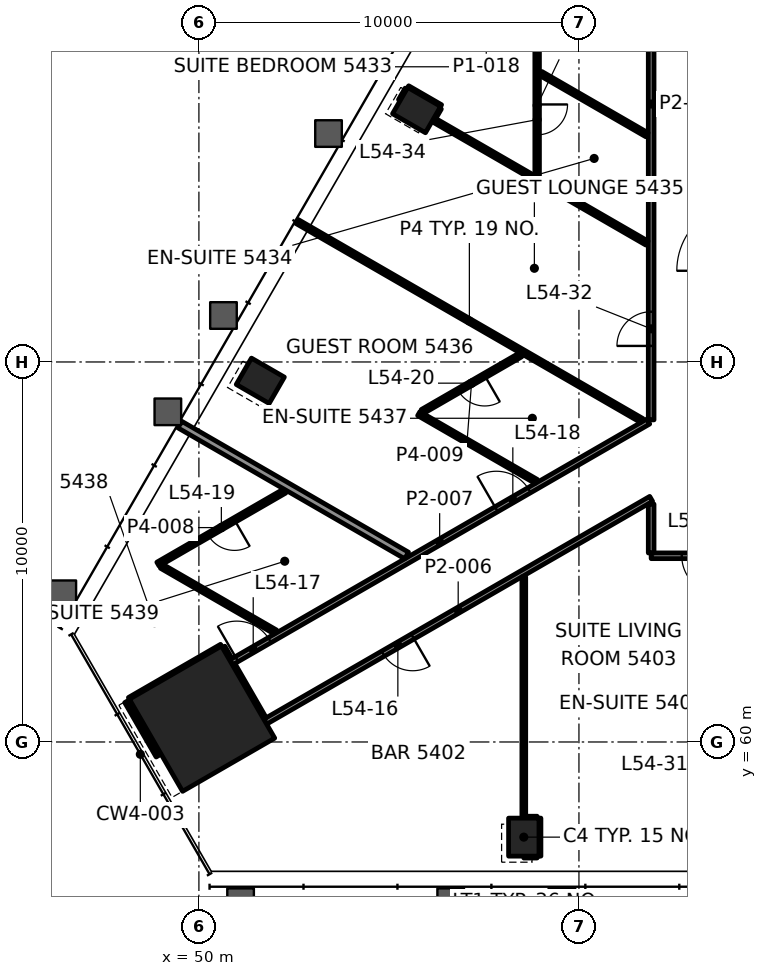
"""IFC4 building model, lengths in metres.
Left out: names, types, materials, properties, quantities, classifications, styles, units other than length and angle.
Written with IfcOpenShell. Run it as: python <this file> out.ifc"""

import sys

from ifc_helpers import new_model, si_unit, direction, frame, frame_2d, origin, origin_2d, place, context, subcontext, project, spatial, rectangle, hollow_rectangle, extrude, element, fill, save


model = new_model("IFC4")
c1 = context("Model", 3, precision=1e-05, world=origin(), true_north=direction((0.0, 1.0)))
c2 = subcontext(c1, "Body", "Model", "MODEL_VIEW")
j1 = project(units=[si_unit("LENGTHUNIT", "METRE"), si_unit("PLANEANGLEUNIT", "RADIAN")], contexts=[c1])
p1 = place(None, origin())
s1 = spatial("IfcSite", under=j1, at=p1, CompositionType="ELEMENT")
p2 = place(p1, origin())
s2 = spatial("IfcBuilding", under=s1, at=p2, CompositionType="ELEMENT")
p3 = place(p2, frame((0.0, 0.0, 229.9)))
s3 = spatial("IfcBuildingStorey", under=s2, at=p3, CompositionType="ELEMENT", Elevation=229.9)
p4 = place(p3, frame((50.082, 60.614, 0.0), z_axis=(0.0, 0.0, 1.0), x_axis=(0.5, -0.866025403784, 0.0)))
e1 = element("IfcColumn", 1, at=p4, inside=s3, PredefinedType="COLUMN", context=c2, shape_type="SweptSolid", body=[
    extrude(rectangle(XDim=2.8, YDim=2.8, at=origin_2d()), origin(), (0.0, 0.0, 1.0), 3.9),
])
for number, where, z_axis, x_axis in (
    (2, (58.549, 57.496, -0.0), (0.0, 0.0, 1.0), (1.0, 0.0, 0.0)),
    (3, (55.728, 76.628, -0.0), (0.0, 0.0, 1.0), (-0.5, -0.866, 0.0)),
    (4, (51.615, 69.505, -0.0), (0.0, 0.0, 1.0), (-0.5, -0.866, 0.0)),
):
    element("IfcColumn", number, at=place(p3, frame(where, z_axis=z_axis, x_axis=x_axis)), inside=s3, PredefinedType="COLUMN", context=c2, shape_type="SweptSolid", body=[
        extrude(hollow_rectangle(XDim=0.8, YDim=1.0, WallThickness=0.05, at=origin_2d()), origin(), (0.0, 0.0, 1.0), 3.9),
    ])
p5 = place(p3, frame((58.549, 56.996, 0.0), z_axis=(0.0, 0.0, 1.0), x_axis=(1.0, 0.0, 0.0)))
e5 = element("IfcWall", 5, at=p5, inside=s3, PredefinedType="PARTITIONING", context=c2, shape_type="SweptSolid", body=[
    extrude(rectangle(XDim=0.35, YDim=0.1, at=frame_2d((0.175, 0.0))), origin(), (0.0, 0.0, 1.0), 3.1),
])
p6 = place(p3, frame((58.609, 57.996, 0.0), z_axis=(0.0, 0.0, 1.0), x_axis=(1.0, 0.0, 0.0)))
e6 = element("IfcWall", 6, at=p6, inside=s3, PredefinedType="PARTITIONING", context=c2, shape_type="SweptSolid", body=[
    extrude(rectangle(XDim=0.29, YDim=0.1, at=frame_2d((0.145, 0.0))), origin(), (0.0, 0.0, 1.0), 3.1),
])
p7 = place(p3, frame((88.099, 64.9, 0.0), z_axis=(0.0, 0.0, 1.0), x_axis=(-1.0, 0.0, 0.0)))
e7 = element("IfcWall", 7, at=p7, inside=s3, PredefinedType="PARTITIONING", context=c2, shape_type="SweptSolid", body=[
    extrude(rectangle(XDim=26.199, YDim=0.15, at=frame_2d((13.1, 0.0))), origin(), (0.0, 0.0, 1.0), 3.1),
])
p8 = place(p7, frame((2.088, 0.0, 0.0)))
e8 = element("IfcOpeningElement", 8, at=p8, cuts=e7, PredefinedType="OPENING", context=c2, shape_type="SweptSolid", body=[
    extrude(rectangle(XDim=0.9, YDim=2.1, at=frame_2d((0.45, 1.05))), frame((0.0, 0.085, 0.0), z_axis=(0.0, -1.0, 0.0), x_axis=(1.0, 0.0, 0.0)), (0.0, 0.0, 1.0), 0.17),
])
p9 = place(p7, frame((5.4, 0.0, 0.0)))
e9 = element("IfcOpeningElement", 9, at=p9, cuts=e7, PredefinedType="OPENING", context=c2, shape_type="SweptSolid", body=[
    extrude(rectangle(XDim=1.0, YDim=2.1, at=frame_2d((0.5, 1.05))), frame((0.0, 0.085, 0.0), z_axis=(0.0, -1.0, 0.0), x_axis=(1.0, 0.0, 0.0)), (0.0, 0.0, 1.0), 0.17),
])
p10 = place(p7, frame((17.946, 0.0, 0.0)))
e10 = element("IfcOpeningElement", 10, at=p10, cuts=e7, PredefinedType="OPENING", context=c2, shape_type="SweptSolid", body=[
    extrude(rectangle(XDim=1.0, YDim=2.1, at=frame_2d((0.5, 1.05))), frame((0.0, 0.085, 0.0), z_axis=(0.0, -1.0, 0.0), x_axis=(1.0, 0.0, 0.0)), (0.0, 0.0, 1.0), 0.17),
])
p11 = place(p7, frame((24.395, 0.0, 0.0)))
e11 = element("IfcOpeningElement", 11, at=p11, cuts=e7, PredefinedType="OPENING", context=c2, shape_type="SweptSolid", body=[
    extrude(rectangle(XDim=1.0, YDim=2.1, at=frame_2d((0.5, 1.05))), frame((0.0, 0.085, 0.0), z_axis=(0.0, -1.0, 0.0), x_axis=(1.0, 0.0, 0.0)), (0.0, 0.0, 1.0), 0.17),
])
p12 = place(p3, frame((61.9, 66.397, 0.0), z_axis=(0.0, 0.0, 1.0), x_axis=(-0.866028172479, -0.49999520445, 0.0)))
e12 = element("IfcWall", 12, at=p12, inside=s3, PredefinedType="PARTITIONING", context=c2, shape_type="SweptSolid", body=[
    extrude(rectangle(XDim=11.726, YDim=0.15, at=frame_2d((5.863, 0.0))), origin(), (0.0, 0.0, 1.0), 2.947),
])
p13 = place(p12, frame((7.246, 0.0, 0.0)))
e13 = element("IfcOpeningElement", 13, at=p13, cuts=e12, PredefinedType="OPENING", context=c2, shape_type="SweptSolid", body=[
    extrude(rectangle(XDim=0.9, YDim=2.1, at=frame_2d((0.45, 1.05))), frame((0.0, 0.085, 0.0), z_axis=(0.0, -1.0, 0.0), x_axis=(1.0, 0.0, 0.0)), (0.0, 0.0, 1.0), 0.17),
])
p14 = place(p3, frame((50.844, 62.093, 0.0), z_axis=(0.0, 0.0, 1.0), x_axis=(0.866032955338, 0.499986920098, 0.0)))
e14 = element("IfcWall", 14, at=p14, inside=s3, PredefinedType="PARTITIONING", context=c2, shape_type="SweptSolid", body=[
    extrude(rectangle(XDim=12.679, YDim=0.15, at=frame_2d((6.339, 0.0))), origin(), (0.0, 0.0, 1.0), 3.1),
])
p15 = place(p14, frame((0.175, 0.0, 0.0)))
e15 = element("IfcOpeningElement", 15, at=p15, cuts=e14, PredefinedType="OPENING", context=c2, shape_type="SweptSolid", body=[
    extrude(rectangle(XDim=1.0, YDim=2.1, at=frame_2d((0.5, 1.05))), frame((0.0, 0.085, 0.0), z_axis=(0.0, -1.0, 0.0), x_axis=(1.0, 0.0, 0.0)), (0.0, 0.0, 1.0), 0.17),
])
p16 = place(p14, frame((8.063, 0.0, 0.0)))
e16 = element("IfcOpeningElement", 16, at=p16, cuts=e14, PredefinedType="OPENING", context=c2, shape_type="SweptSolid", body=[
    extrude(rectangle(XDim=1.0, YDim=2.1, at=frame_2d((0.5, 1.05))), frame((0.0, 0.085, 0.0), z_axis=(0.0, -1.0, 0.0), x_axis=(1.0, 0.0, 0.0)), (0.0, 0.0, 1.0), 0.17),
])
p17 = place(p3, frame((48.17, 61.126, 0.0), z_axis=(0.0, 0.0, 1.0), x_axis=(0.866034573852, 0.49998411664, 0.0)))
e17 = element("IfcWall", 17, at=p17, inside=s3, PredefinedType="PARTITIONING", context=c2, shape_type="SweptSolid", body=[
    extrude(rectangle(XDim=2.8, YDim=0.1, at=frame_2d((1.4, 0.0))), origin(), (0.0, 0.0, 1.0), 3.1),
])
p18 = place(p3, frame((52.258, 66.604, 0.0), z_axis=(0.0, 0.0, 1.0), x_axis=(-0.86601030197, -0.500026156197, 0.0)))
e18 = element("IfcWall", 18, at=p18, inside=s3, PredefinedType="PARTITIONING", context=c2, shape_type="SweptSolid", body=[
    extrude(rectangle(XDim=3.85, YDim=0.12, at=frame_2d((1.925, 0.0))), origin(), (0.0, 0.0, 1.0), 3.1),
])
p19 = place(p18, frame((1.525, 0.0, 0.0)))
e19 = element("IfcOpeningElement", 19, at=p19, cuts=e18, PredefinedType="OPENING", context=c2, shape_type="SweptSolid", body=[
    extrude(rectangle(XDim=0.8, YDim=2.1, at=frame_2d((0.4, 1.05))), frame((0.0, 0.07, 0.0), z_axis=(0.0, -1.0, 0.0), x_axis=(1.0, 0.0, 0.0)), (0.0, 0.0, 1.0), 0.14),
])
p20 = place(p3, frame((58.467, 70.189, 0.0), z_axis=(0.0, 0.0, 1.0), x_axis=(-0.86604676013, -0.4999630079, 0.0)))
e20 = element("IfcWall", 20, at=p20, inside=s3, PredefinedType="PARTITIONING", context=c2, shape_type="SweptSolid", body=[
    extrude(rectangle(XDim=2.987, YDim=0.12, at=frame_2d((1.494, 0.0))), origin(), (0.0, 0.0, 1.0), 3.1),
])
p21 = place(p20, frame((1.094, 0.0, 0.0)))
e21 = element("IfcOpeningElement", 21, at=p21, cuts=e20, PredefinedType="OPENING", context=c2, shape_type="SweptSolid", body=[
    extrude(rectangle(XDim=0.8, YDim=2.1, at=frame_2d((0.4, 1.05))), frame((0.0, 0.07, 0.0), z_axis=(0.0, -1.0, 0.0), x_axis=(1.0, 0.0, 0.0)), (0.0, 0.0, 1.0), 0.14),
])
p22 = place(p3, frame((56.192, 76.431, 0.0), z_axis=(0.0, 0.0, 1.0), x_axis=(0.500136839105, 0.865946385275, 0.0)))
e22 = element("IfcWall", 22, at=p22, inside=s3, PredefinedType="PARTITIONING", context=c2, shape_type="SweptSolid", body=[
    extrude(rectangle(XDim=0.289, YDim=0.1, at=frame_2d((0.145, 0.0))), origin(), (0.0, 0.0, 1.0), 3.1),
])
p23 = place(p3, frame((55.296, 76.879, 0.0), z_axis=(0.0, 0.0, 1.0), x_axis=(0.500126092966, 0.865952591736, 0.0)))
e23 = element("IfcWall", 23, at=p23, inside=s3, PredefinedType="PARTITIONING", context=c2, shape_type="SweptSolid", body=[
    extrude(rectangle(XDim=0.349, YDim=0.1, at=frame_2d((0.175, 0.0))), origin(), (0.0, 0.0, 1.0), 3.1),
])
p24 = place(p3, frame((61.9, 64.975, 0.0), z_axis=(0.0, 0.0, 1.0), x_axis=(0.0, 1.0, 0.0)))
e24 = element("IfcWall", 24, at=p24, inside=s3, PredefinedType="PARTITIONING", context=c2, shape_type="SweptSolid", body=[
    extrude(rectangle(XDim=1.286, YDim=0.15, at=frame_2d((0.643, 0.0))), origin(), (0.0, 0.0, 1.0), 2.947),
])
p25 = place(p3, frame((61.9, 68.476, 0.0), z_axis=(0.0, 0.0, 1.0), x_axis=(0.0, 1.0, 0.0)))
e25 = element("IfcWall", 25, at=p25, inside=s3, PredefinedType="PARTITIONING", context=c2, shape_type="SweptSolid", body=[
    extrude(rectangle(XDim=16.624, YDim=0.15, at=frame_2d((8.312, 0.0))), origin(), (0.0, 0.0, 1.0), 3.1),
])
p26 = place(p25, frame((1.946, 0.0, 0.0)))
e26 = element("IfcOpeningElement", 26, at=p26, cuts=e25, PredefinedType="OPENING", context=c2, shape_type="SweptSolid", body=[
    extrude(rectangle(XDim=0.9, YDim=2.1, at=frame_2d((0.45, 1.05))), frame((0.0, 0.085, 0.0), z_axis=(0.0, -1.0, 0.0), x_axis=(1.0, 0.0, 0.0)), (0.0, 0.0, 1.0), 0.17),
])
p27 = place(p25, frame((10.263, 0.0, 0.0)))
e27 = element("IfcOpeningElement", 27, at=p27, cuts=e25, PredefinedType="OPENING", context=c2, shape_type="SweptSolid", body=[
    extrude(rectangle(XDim=1.0, YDim=2.1, at=frame_2d((0.5, 1.05))), frame((0.0, 0.085, 0.0), z_axis=(0.0, -1.0, 0.0), x_axis=(1.0, 0.0, 0.0)), (0.0, 0.0, 1.0), 0.17),
])
p28 = place(p3, frame((58.949, 56.996, 0.0), z_axis=(0.0, 0.0, 1.0), x_axis=(0.0, 1.0, 0.0)))
e28 = element("IfcWall", 28, at=p28, inside=s3, PredefinedType="PARTITIONING", context=c2, shape_type="SweptSolid", body=[
    extrude(rectangle(XDim=1.0, YDim=0.1, at=frame_2d((0.5, 0.0))), origin(), (0.0, 0.0, 1.0), 3.022),
])
p29 = place(p3, frame((58.9, 78.596, 0.0), z_axis=(0.0, 0.0, 1.0), x_axis=(0.0, -1.0, 0.0)))
e29 = element("IfcWall", 29, at=p29, inside=s3, PredefinedType="PARTITIONING", context=c2, shape_type="SweptSolid", body=[
    extrude(rectangle(XDim=3.69, YDim=0.12, at=frame_2d((1.845, 0.0))), origin(), (0.0, 0.0, 1.0), 3.1),
])
p30 = place(p29, frame((1.82, 0.0, 0.0)))
e30 = element("IfcOpeningElement", 30, at=p30, cuts=e29, PredefinedType="OPENING", context=c2, shape_type="SweptSolid", body=[
    extrude(rectangle(XDim=0.8, YDim=2.1, at=frame_2d((0.4, 1.05))), frame((0.0, 0.07, 0.0), z_axis=(0.0, -1.0, 0.0), x_axis=(1.0, 0.0, 0.0)), (0.0, 0.0, 1.0), 0.14),
])
p31 = place(p3, frame((58.549, 57.996, 0.0), z_axis=(0.0, 0.0, 1.0), x_axis=(0.0, 1.0, 0.0)))
e31 = element("IfcWall", 31, at=p31, inside=s3, PredefinedType="PARTITIONING", context=c2, shape_type="SweptSolid", body=[
    extrude(rectangle(XDim=6.35, YDim=0.1, at=frame_2d((3.175, 0.0))), origin(), (0.0, 0.0, 1.0), 2.947),
])
p32 = place(p3, frame((51.707, 60.6, 0.0), z_axis=(0.0, 0.0, 1.0), x_axis=(-0.499991515992, 0.866030301974, 0.0)))
e32 = element("IfcWall", 32, at=p32, inside=s3, PredefinedType="PARTITIONING", context=c2, shape_type="SweptSolid", body=[
    extrude(rectangle(XDim=1.649, YDim=0.15, at=frame_2d((0.825, 0.0))), origin(), (0.0, 0.0, 1.0), 2.947),
])
p33 = place(p3, frame((48.918, 59.63, 0.0), z_axis=(0.0, 0.0, 1.0), x_axis=(-0.500029155639, 0.866008570114, 0.0)))
e33 = element("IfcWall", 33, at=p33, inside=s3, PredefinedType="PARTITIONING", context=c2, shape_type="SweptSolid", body=[
    extrude(rectangle(XDim=1.654, YDim=0.1, at=frame_2d((0.827, 0.0))), origin(), (0.0, 0.0, 1.0), 3.1),
])
p34 = place(p3, frame((61.79, 75.978, 0.0), z_axis=(0.0, 0.0, 1.0), x_axis=(-0.866033195618, 0.499986503906, 0.0)))
e34 = element("IfcWall", 34, at=p34, inside=s3, PredefinedType="PARTITIONING", context=c2, shape_type="SweptSolid", body=[
    extrude(rectangle(XDim=3.228, YDim=0.12, at=frame_2d((1.614, 0.0))), origin(), (0.0, 0.0, 1.0), 3.1),
])
p35 = place(p3, frame((56.361, 76.725, 0.0), z_axis=(0.0, 0.0, 1.0), x_axis=(-0.866039090965, 0.499976292358, 0.0)))
e35 = element("IfcWall", 35, at=p35, inside=s3, PredefinedType="PARTITIONING", context=c2, shape_type="SweptSolid", body=[
    extrude(rectangle(XDim=0.999, YDim=0.1, at=frame_2d((0.5, 0.0))), origin(), (0.0, 0.0, 1.0), 3.022),
])
p36 = place(p3, frame((61.79, 73.128, 0.0), z_axis=(0.0, 0.0, 1.0), x_axis=(-0.866022320763, 0.500005339912, 0.0)))
e36 = element("IfcWall", 36, at=p36, inside=s3, PredefinedType="PARTITIONING", context=c2, shape_type="SweptSolid", body=[
    extrude(rectangle(XDim=6.5, YDim=0.12, at=frame_2d((3.25, 0.0))), origin(), (0.0, 0.0, 1.0), 3.1),
])
p37 = place(p3, frame((61.652, 68.46, 0.0), z_axis=(0.0, 0.0, 1.0), x_axis=(-0.866025672267, 0.499999534974, 0.0)))
e37 = element("IfcWall", 37, at=p37, inside=s3, PredefinedType="PARTITIONING", context=c2, shape_type="SweptSolid", body=[
    extrude(rectangle(XDim=10.475, YDim=0.12, at=frame_2d((5.237, 0.0))), origin(), (0.0, 0.0, 1.0), 3.022),
])
p38 = place(p3, frame((58.876, 66.856, 0.0), z_axis=(0.0, 0.0, 1.0), x_axis=(-0.866028357664, 0.499994883695, 0.0)))
e38 = element("IfcWall", 38, at=p38, inside=s3, PredefinedType="PARTITIONING", context=c2, shape_type="SweptSolid", body=[
    extrude(rectangle(XDim=3.568, YDim=0.12, at=frame_2d((1.784, 0.0))), origin(), (0.0, 0.0, 1.0), 3.1),
])
p39 = place(p3, frame((55.465, 64.907, 0.0), z_axis=(0.0, 0.0, 1.0), x_axis=(-0.866022205013, 0.500005540394, 0.0)))
e39 = element("IfcWall", 39, at=p39, inside=s3, PredefinedType="PARTITIONING", context=c2, shape_type="SweptSolid", body=[
    extrude(rectangle(XDim=6.893, YDim=0.2, at=frame_2d((3.447, 0.0))), origin(), (0.0, 0.0, 1.0), 3.1),
])
p40 = place(p3, frame((52.014, 62.895, 0.0), z_axis=(0.0, 0.0, 1.0), x_axis=(-0.866045730533, 0.499964791386, 0.0)))
e40 = element("IfcWall", 40, at=p40, inside=s3, PredefinedType="PARTITIONING", context=c2, shape_type="SweptSolid", body=[
    extrude(rectangle(XDim=3.459, YDim=0.12, at=frame_2d((1.729, 0.0))), origin(), (0.0, 0.0, 1.0), 3.1),
])
p41 = place(p3, frame((50.807, 62.158, 0.0), z_axis=(0.0, 0.0, 1.0), x_axis=(-0.500060622324, 0.86599040064, 0.0)))
e41 = element("IfcWall", 41, at=p41, inside=s3, PredefinedType="PARTITIONING", context=c2, shape_type="SweptSolid", body=[
    extrude(rectangle(XDim=0.375, YDim=0.15, at=frame_2d((0.188, 0.0))), origin(), (0.0, 0.0, 1.0), 3.1),
])
p42 = place(p11, origin())
e42 = element("IfcDoor", 42, at=p42, inside=s3, OperationType="SINGLE_SWING_LEFT", PredefinedType="DOOR", context=c2, shape_type="SweptSolid", body=[
    extrude(rectangle(XDim=1.0, YDim=2.1, at=frame_2d((0.5, 1.05))), frame((0.0, 0.025, 0.0), z_axis=(0.0, -1.0, 0.0), x_axis=(1.0, 0.0, 0.0)), (0.0, 0.0, 1.0), 0.05),
])
fill(e11, e42)
p43 = place(p13, origin())
e43 = element("IfcDoor", 43, at=p43, inside=s3, OperationType="SINGLE_SWING_RIGHT", PredefinedType="DOOR", context=c2, shape_type="SweptSolid", body=[
    extrude(rectangle(XDim=0.9, YDim=2.1, at=frame_2d((0.45, 1.05))), frame((0.0, 0.025, 0.0), z_axis=(0.0, -1.0, 0.0), x_axis=(1.0, 0.0, 0.0)), (0.0, 0.0, 1.0), 0.05),
])
fill(e13, e43)
p44 = place(p15, origin())
e44 = element("IfcDoor", 44, at=p44, inside=s3, OperationType="SINGLE_SWING_LEFT", PredefinedType="DOOR", context=c2, shape_type="SweptSolid", body=[
    extrude(rectangle(XDim=1.0, YDim=2.1, at=frame_2d((0.5, 1.05))), frame((0.0, 0.025, 0.0), z_axis=(0.0, -1.0, 0.0), x_axis=(1.0, 0.0, 0.0)), (0.0, 0.0, 1.0), 0.05),
])
fill(e15, e44)
p45 = place(p16, origin())
e45 = element("IfcDoor", 45, at=p45, inside=s3, OperationType="SINGLE_SWING_LEFT", PredefinedType="DOOR", context=c2, shape_type="SweptSolid", body=[
    extrude(rectangle(XDim=1.0, YDim=2.1, at=frame_2d((0.5, 1.05))), frame((0.0, 0.025, 0.0), z_axis=(0.0, -1.0, 0.0), x_axis=(1.0, 0.0, 0.0)), (0.0, 0.0, 1.0), 0.05),
])
fill(e16, e45)
p46 = place(p19, origin())
e46 = element("IfcDoor", 46, at=p46, inside=s3, OperationType="SINGLE_SWING_LEFT", PredefinedType="DOOR", context=c2, shape_type="SweptSolid", body=[
    extrude(rectangle(XDim=0.8, YDim=2.1, at=frame_2d((0.4, 1.05))), frame((0.0, 0.025, 0.0), z_axis=(0.0, -1.0, 0.0), x_axis=(1.0, 0.0, 0.0)), (0.0, 0.0, 1.0), 0.05),
])
fill(e19, e46)
p47 = place(p21, origin())
e47 = element("IfcDoor", 47, at=p47, inside=s3, OperationType="SINGLE_SWING_LEFT", PredefinedType="DOOR", context=c2, shape_type="SweptSolid", body=[
    extrude(rectangle(XDim=0.8, YDim=2.1, at=frame_2d((0.4, 1.05))), frame((0.0, 0.025, 0.0), z_axis=(0.0, -1.0, 0.0), x_axis=(1.0, 0.0, 0.0)), (0.0, 0.0, 1.0), 0.05),
])
fill(e21, e47)
p48 = place(p26, origin())
e48 = element("IfcDoor", 48, at=p48, inside=s3, OperationType="SINGLE_SWING_RIGHT", PredefinedType="DOOR", context=c2, shape_type="SweptSolid", body=[
    extrude(rectangle(XDim=0.9, YDim=2.1, at=frame_2d((0.45, 1.05))), frame((0.0, 0.025, 0.0), z_axis=(0.0, -1.0, 0.0), x_axis=(1.0, 0.0, 0.0)), (0.0, 0.0, 1.0), 0.05),
])
fill(e26, e48)
p49 = place(p30, origin())
e49 = element("IfcDoor", 49, at=p49, inside=s3, OperationType="SINGLE_SWING_RIGHT", PredefinedType="DOOR", context=c2, shape_type="SweptSolid", body=[
    extrude(rectangle(XDim=0.8, YDim=2.1, at=frame_2d((0.4, 1.05))), frame((0.0, 0.025, 0.0), z_axis=(0.0, -1.0, 0.0), x_axis=(1.0, 0.0, 0.0)), (0.0, 0.0, 1.0), 0.05),
])
fill(e30, e49)
p50 = place(p3, origin())
p51 = place(p50, frame((53.067, 56.191, 0.15), z_axis=(0.0, 0.0, 1.0), x_axis=(1.0, 0.0, 0.0)))
p52 = place(p51, origin())
e50 = element("IfcWindow", 50, at=p52, inside=s3, PartitioningType="SINGLE_PANEL", PredefinedType="WINDOW", context=c2, shape_type="SweptSolid", body=[
    extrude(rectangle(XDim=2.667, YDim=3.55, at=frame_2d((1.333, 1.775))), frame((0.0, 0.03, 0.0), z_axis=(0.0, -1.0, 0.0), x_axis=(1.0, 0.0, 0.0)), (0.0, 0.0, 1.0), 0.06),
])
p53 = place(p50, frame((53.198, 74.855, 0.15), z_axis=(0.0, 0.0, 1.0), x_axis=(-0.5, -0.866025, 0.0)))
p54 = place(p53, origin())
e51 = element("IfcWindow", 51, at=p54, inside=s3, PartitioningType="SINGLE_PANEL", PredefinedType="WINDOW", context=c2, shape_type="SweptSolid", body=[
    extrude(rectangle(XDim=2.667, YDim=3.55, at=frame_2d((1.333, 1.775))), frame((0.0, 0.03, 0.0), z_axis=(0.0, -1.0, 0.0), x_axis=(1.0, 0.0, 0.0)), (0.0, 0.0, 1.0), 0.06),
])
save(model, sys.argv[1])
